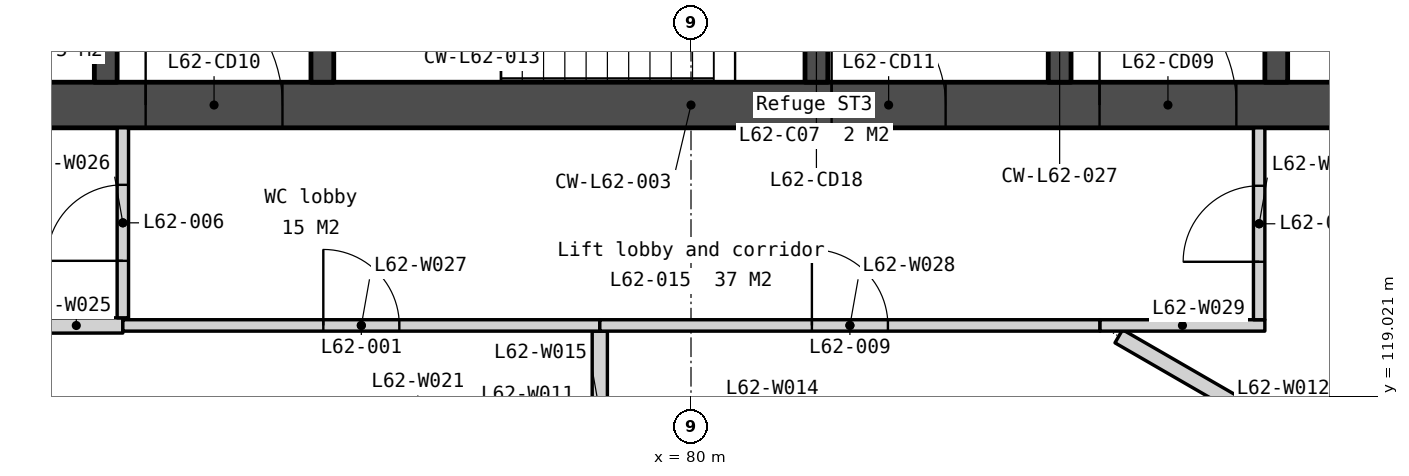
"""IFC4 building model, lengths in metres.
Left out: names, types, materials, properties, quantities, classifications, styles, units other than length and angle.
Written with IfcOpenShell. Run it as: python <this file> out.ifc"""

import sys

from ifc_helpers import new_model, si_unit, direction, frame, frame_2d, origin, place, context, subcontext, project, spatial, polyline, rectangle, outline, extrude, element, fill, save


model = new_model("IFC4")
c1 = context("Model", 3, precision=1e-05, world=origin(), true_north=direction((0.0, 1.0)))
c2 = subcontext(c1, "Body", "Model", "MODEL_VIEW")
j1 = project(units=[si_unit("LENGTHUNIT", "METRE"), si_unit("PLANEANGLEUNIT", "RADIAN")], contexts=[c1])
p1 = place(None, origin())
s1 = spatial("IfcSite", under=j1, at=p1, CompositionType="ELEMENT")
p2 = place(p1, origin())
s2 = spatial("IfcBuilding", under=s1, at=p2, CompositionType="ELEMENT")
p3 = place(p2, frame((0.0, 0.0, 254.3)))
s3 = spatial("IfcBuildingStorey", under=s2, at=p3, CompositionType="ELEMENT", Elevation=254.3)
p4 = place(p3, frame((69.0, 122.85, 0.0), z_axis=(0.0, 0.0, 1.0), x_axis=(1.0, 0.0, 0.0)))
e1 = element("IfcWall", 1, at=p4, inside=s3, PredefinedType="SOLIDWALL", context=c2, shape_type="SweptSolid", body=[
    extrude(rectangle(XDim=22.0, YDim=0.6, at=frame_2d((11.0, 0.0))), origin(), (0.0, 0.0, 1.0), 3.75),
])
p5 = place(p4, frame((16.375, 0.0, 0.0)))
e2 = element("IfcOpeningElement", 2, at=p5, cuts=e1, PredefinedType="OPENING", context=c2, shape_type="SweptSolid", body=[
    extrude(rectangle(XDim=1.8, YDim=2.1, at=frame_2d((0.9, 1.05))), frame((0.0, 0.31, 0.0), z_axis=(0.0, -1.0, 0.0), x_axis=(1.0, 0.0, 0.0)), (0.0, 0.0, 1.0), 0.62),
])
p6 = place(p4, frame((3.825, 0.0, 0.0)))
e3 = element("IfcOpeningElement", 3, at=p6, cuts=e1, PredefinedType="OPENING", context=c2, shape_type="SweptSolid", body=[
    extrude(rectangle(XDim=1.8, YDim=2.1, at=frame_2d((0.9, 1.05))), frame((0.0, 0.31, 0.0), z_axis=(0.0, -1.0, 0.0), x_axis=(1.0, 0.0, 0.0)), (0.0, 0.0, 1.0), 0.62),
])
p7 = place(p4, frame((12.85, 0.0, 0.0)))
e4 = element("IfcOpeningElement", 4, at=p7, cuts=e1, PredefinedType="OPENING", context=c2, shape_type="SweptSolid", body=[
    extrude(rectangle(XDim=1.5, YDim=2.1, at=frame_2d((0.75, 1.05))), frame((0.0, 0.31, 0.0), z_axis=(0.0, -1.0, 0.0), x_axis=(1.0, 0.0, 0.0)), (0.0, 0.0, 1.0), 0.62),
])
p8 = place(p3, frame((72.3, 133.95, 0.0), z_axis=(0.0, 0.0, 1.0), x_axis=(0.0, -1.0, 0.0)))
e5 = element("IfcWall", 5, at=p8, inside=s3, PredefinedType="SOLIDWALL", context=c2, shape_type="SweptSolid", body=[
    extrude(rectangle(XDim=10.8, YDim=0.3, at=frame_2d((5.4, 0.0))), origin(), (0.0, 0.0, 1.0), 3.75),
])
p9 = place(p8, frame((6.95, 0.0, 0.0)))
e6 = element("IfcOpeningElement", 6, at=p9, cuts=e5, PredefinedType="OPENING", context=c2, shape_type="SweptSolid", body=[
    extrude(rectangle(XDim=1.1, YDim=2.1, at=frame_2d((0.55, 1.05))), frame((0.0, 0.16, 0.0), z_axis=(0.0, -1.0, 0.0), x_axis=(1.0, 0.0, 0.0)), (0.0, 0.0, 1.0), 0.32),
])
p10 = place(p8, frame((9.35, 0.0, 0.0)))
e7 = element("IfcOpeningElement", 7, at=p10, cuts=e5, PredefinedType="OPENING", context=c2, shape_type="SweptSolid", body=[
    extrude(rectangle(XDim=0.9, YDim=2.1, at=frame_2d((0.45, 1.05))), frame((0.0, 0.16, 0.0), z_axis=(0.0, -1.0, 0.0), x_axis=(1.0, 0.0, 0.0)), (0.0, 0.0, 1.0), 0.32),
])
p11 = place(p8, frame((5.1, 0.0, 0.0)))
e8 = element("IfcOpeningElement", 8, at=p11, cuts=e5, PredefinedType="OPENING", context=c2, shape_type="SweptSolid", body=[
    extrude(rectangle(XDim=1.0, YDim=2.1, at=frame_2d((0.5, 1.05))), frame((0.0, 0.16, 0.0), z_axis=(0.0, -1.0, 0.0), x_axis=(1.0, 0.0, 0.0)), (0.0, 0.0, 1.0), 0.32),
])
p12 = place(p3, frame((75.15, 125.7, 0.0), z_axis=(0.0, 0.0, 1.0), x_axis=(0.0, -1.0, 0.0)))
e9 = element("IfcWall", 9, at=p12, inside=s3, PredefinedType="SOLIDWALL", context=c2, shape_type="SweptSolid", body=[
    extrude(rectangle(XDim=2.55, YDim=0.3, at=frame_2d((1.275, 0.0))), origin(), (0.0, 0.0, 1.0), 3.75),
])
p13 = place(p3, frame((81.65, 125.7, 0.0), z_axis=(0.0, 0.0, 1.0), x_axis=(0.0, -1.0, 0.0)))
e10 = element("IfcWall", 10, at=p13, inside=s3, PredefinedType="SOLIDWALL", context=c2, shape_type="SweptSolid", body=[
    extrude(rectangle(XDim=2.55, YDim=0.3, at=frame_2d((1.275, 0.0))), origin(), (0.0, 0.0, 1.0), 3.75),
])
p14 = place(p13, frame((0.75, 0.0, 0.0)))
e11 = element("IfcOpeningElement", 11, at=p14, cuts=e10, PredefinedType="OPENING", context=c2, shape_type="SweptSolid", body=[
    extrude(rectangle(XDim=1.0, YDim=2.1, at=frame_2d((0.5, 1.05))), frame((0.0, 0.16, 0.0), z_axis=(0.0, -1.0, 0.0), x_axis=(1.0, 0.0, 0.0)), (0.0, 0.0, 1.0), 0.32),
])
p15 = place(p3, frame((84.85, 125.85, 0.0), z_axis=(0.0, 0.0, 1.0), x_axis=(0.0, -1.0, 0.0)))
e12 = element("IfcWall", 12, at=p15, inside=s3, PredefinedType="SOLIDWALL", context=c2, shape_type="SweptSolid", body=[
    extrude(rectangle(XDim=2.7, YDim=0.3, at=frame_2d((1.35, 0.0))), origin(), (0.0, 0.0, 1.0), 3.75),
])
p16 = place(p3, frame((87.7, 133.95, 0.0), z_axis=(0.0, 0.0, 1.0), x_axis=(0.0, -1.0, 0.0)))
e13 = element("IfcWall", 13, at=p16, inside=s3, PredefinedType="SOLIDWALL", context=c2, shape_type="SweptSolid", body=[
    extrude(rectangle(XDim=10.8, YDim=0.3, at=frame_2d((5.4, 0.0))), origin(), (0.0, 0.0, 1.0), 3.75),
])
p17 = place(p16, frame((6.95, 0.0, 0.0)))
e14 = element("IfcOpeningElement", 14, at=p17, cuts=e13, PredefinedType="OPENING", context=c2, shape_type="SweptSolid", body=[
    extrude(rectangle(XDim=1.1, YDim=2.1, at=frame_2d((0.55, 1.05))), frame((0.0, 0.16, 0.0), z_axis=(0.0, -1.0, 0.0), x_axis=(1.0, 0.0, 0.0)), (0.0, 0.0, 1.0), 0.32),
])
p18 = place(p16, frame((5.1, 0.0, 0.0)))
e15 = element("IfcOpeningElement", 15, at=p18, cuts=e13, PredefinedType="OPENING", context=c2, shape_type="SweptSolid", body=[
    extrude(rectangle(XDim=1.0, YDim=2.1, at=frame_2d((0.5, 1.05))), frame((0.0, 0.16, 0.0), z_axis=(0.0, -1.0, 0.0), x_axis=(1.0, 0.0, 0.0)), (0.0, 0.0, 1.0), 0.32),
])
p19 = place(p16, frame((9.25, 0.0, 0.0)))
e16 = element("IfcOpeningElement", 16, at=p19, cuts=e13, PredefinedType="OPENING", context=c2, shape_type="SweptSolid", body=[
    extrude(rectangle(XDim=1.1, YDim=2.1, at=frame_2d((0.55, 1.05))), frame((0.0, 0.16, 0.0), z_axis=(0.0, -1.0, 0.0), x_axis=(1.0, 0.0, 0.0)), (0.0, 0.0, 1.0), 0.32),
])
p20 = place(p3, frame((60.609, 133.207, -0.15), z_axis=(0.0, 0.0, 1.0), x_axis=(0.500002536638, -0.866023939251, 0.0)))
e17 = element("IfcWall", 17, at=p20, inside=s3, PredefinedType="SOLIDWALL", context=c2, shape_type="SweptSolid", body=[
    extrude(outline(polyline([(36.972, 0.0), (36.972, 3.9), (0.0, 3.9), (0.0, 0.0), (36.972, 0.0)])), frame((0.0, 0.225, 0.0), z_axis=(0.0, -1.0, 0.0), x_axis=(1.0, 0.0, 0.0)), (0.0, 0.0, 1.0), 0.45),
])
p21 = place(p20, frame((3.172, 0.0, 0.95)))
e18 = element("IfcOpeningElement", 18, at=p21, cuts=e17, PredefinedType="OPENING", context=c2, shape_type="SweptSolid", body=[
    extrude(rectangle(XDim=1.2, YDim=2.2, at=frame_2d((0.6, 1.1))), frame((0.0, 0.235, 0.0), z_axis=(0.0, -1.0, 0.0), x_axis=(1.0, 0.0, 0.0)), (0.0, 0.0, 1.0), 0.47),
])
p22 = place(p20, frame((4.872, 0.0, 0.95)))
e19 = element("IfcOpeningElement", 19, at=p22, cuts=e17, PredefinedType="OPENING", context=c2, shape_type="SweptSolid", body=[
    extrude(rectangle(XDim=1.2, YDim=2.2, at=frame_2d((0.6, 1.1))), frame((0.0, 0.235, 0.0), z_axis=(0.0, -1.0, 0.0), x_axis=(1.0, 0.0, 0.0)), (0.0, 0.0, 1.0), 0.47),
])
p23 = place(p20, frame((12.415, 0.0, 0.95)))
e20 = element("IfcOpeningElement", 20, at=p23, cuts=e17, PredefinedType="OPENING", context=c2, shape_type="SweptSolid", body=[
    extrude(rectangle(XDim=1.2, YDim=2.2, at=frame_2d((0.6, 1.1))), frame((0.0, 0.235, 0.0), z_axis=(0.0, -1.0, 0.0), x_axis=(1.0, 0.0, 0.0)), (0.0, 0.0, 1.0), 0.47),
])
p24 = place(p20, frame((14.115, 0.0, 0.95)))
e21 = element("IfcOpeningElement", 21, at=p24, cuts=e17, PredefinedType="OPENING", context=c2, shape_type="SweptSolid", body=[
    extrude(rectangle(XDim=1.2, YDim=2.2, at=frame_2d((0.6, 1.1))), frame((0.0, 0.235, 0.0), z_axis=(0.0, -1.0, 0.0), x_axis=(1.0, 0.0, 0.0)), (0.0, 0.0, 1.0), 0.47),
])
p25 = place(p20, frame((21.658, 0.0, 0.95)))
e22 = element("IfcOpeningElement", 22, at=p25, cuts=e17, PredefinedType="OPENING", context=c2, shape_type="SweptSolid", body=[
    extrude(rectangle(XDim=1.2, YDim=2.2, at=frame_2d((0.6, 1.1))), frame((0.0, 0.235, 0.0), z_axis=(0.0, -1.0, 0.0), x_axis=(1.0, 0.0, 0.0)), (0.0, 0.0, 1.0), 0.47),
])
p26 = place(p20, frame((23.358, 0.0, 0.95)))
e23 = element("IfcOpeningElement", 23, at=p26, cuts=e17, PredefinedType="OPENING", context=c2, shape_type="SweptSolid", body=[
    extrude(rectangle(XDim=1.2, YDim=2.2, at=frame_2d((0.6, 1.1))), frame((0.0, 0.235, 0.0), z_axis=(0.0, -1.0, 0.0), x_axis=(1.0, 0.0, 0.0)), (0.0, 0.0, 1.0), 0.47),
])
p27 = place(p20, frame((30.901, 0.0, 0.95)))
e24 = element("IfcOpeningElement", 24, at=p27, cuts=e17, PredefinedType="OPENING", context=c2, shape_type="SweptSolid", body=[
    extrude(rectangle(XDim=1.2, YDim=2.2, at=frame_2d((0.6, 1.1))), frame((0.0, 0.235, 0.0), z_axis=(0.0, -1.0, 0.0), x_axis=(1.0, 0.0, 0.0)), (0.0, 0.0, 1.0), 0.47),
])
p28 = place(p20, frame((32.601, 0.0, 0.95)))
e25 = element("IfcOpeningElement", 25, at=p28, cuts=e17, PredefinedType="OPENING", context=c2, shape_type="SweptSolid", body=[
    extrude(rectangle(XDim=1.2, YDim=2.2, at=frame_2d((0.6, 1.1))), frame((0.0, 0.235, 0.0), z_axis=(0.0, -1.0, 0.0), x_axis=(1.0, 0.0, 0.0)), (0.0, 0.0, 1.0), 0.47),
])
p29 = place(p3, frame((80.905, 101.188, -0.15), z_axis=(0.0, 0.0, 1.0), x_axis=(0.500002536638, 0.866023939251, 0.0)))
e26 = element("IfcWall", 26, at=p29, inside=s3, PredefinedType="SOLIDWALL", context=c2, shape_type="SweptSolid", body=[
    extrude(outline(polyline([(36.972, 0.0), (36.972, 3.9), (0.0, 3.9), (0.0, 0.0), (36.972, 0.0)])), frame((0.0, 0.225, 0.0), z_axis=(0.0, -1.0, 0.0), x_axis=(1.0, 0.0, 0.0)), (0.0, 0.0, 1.0), 0.45),
])
p30 = place(p29, frame((3.172, 0.0, 0.95)))
e27 = element("IfcOpeningElement", 27, at=p30, cuts=e26, PredefinedType="OPENING", context=c2, shape_type="SweptSolid", body=[
    extrude(rectangle(XDim=1.2, YDim=2.2, at=frame_2d((0.6, 1.1))), frame((0.0, 0.235, 0.0), z_axis=(0.0, -1.0, 0.0), x_axis=(1.0, 0.0, 0.0)), (0.0, 0.0, 1.0), 0.47),
])
p31 = place(p29, frame((4.872, 0.0, 0.95)))
e28 = element("IfcOpeningElement", 28, at=p31, cuts=e26, PredefinedType="OPENING", context=c2, shape_type="SweptSolid", body=[
    extrude(rectangle(XDim=1.2, YDim=2.2, at=frame_2d((0.6, 1.1))), frame((0.0, 0.235, 0.0), z_axis=(0.0, -1.0, 0.0), x_axis=(1.0, 0.0, 0.0)), (0.0, 0.0, 1.0), 0.47),
])
p32 = place(p29, frame((12.415, 0.0, 0.95)))
e29 = element("IfcOpeningElement", 29, at=p32, cuts=e26, PredefinedType="OPENING", context=c2, shape_type="SweptSolid", body=[
    extrude(rectangle(XDim=1.2, YDim=2.2, at=frame_2d((0.6, 1.1))), frame((0.0, 0.235, 0.0), z_axis=(0.0, -1.0, 0.0), x_axis=(1.0, 0.0, 0.0)), (0.0, 0.0, 1.0), 0.47),
])
p33 = place(p29, frame((14.115, 0.0, 0.95)))
e30 = element("IfcOpeningElement", 30, at=p33, cuts=e26, PredefinedType="OPENING", context=c2, shape_type="SweptSolid", body=[
    extrude(rectangle(XDim=1.2, YDim=2.2, at=frame_2d((0.6, 1.1))), frame((0.0, 0.235, 0.0), z_axis=(0.0, -1.0, 0.0), x_axis=(1.0, 0.0, 0.0)), (0.0, 0.0, 1.0), 0.47),
])
p34 = place(p29, frame((21.658, 0.0, 0.95)))
e31 = element("IfcOpeningElement", 31, at=p34, cuts=e26, PredefinedType="OPENING", context=c2, shape_type="SweptSolid", body=[
    extrude(rectangle(XDim=1.2, YDim=2.2, at=frame_2d((0.6, 1.1))), frame((0.0, 0.235, 0.0), z_axis=(0.0, -1.0, 0.0), x_axis=(1.0, 0.0, 0.0)), (0.0, 0.0, 1.0), 0.47),
])
p35 = place(p29, frame((23.358, 0.0, 0.95)))
e32 = element("IfcOpeningElement", 32, at=p35, cuts=e26, PredefinedType="OPENING", context=c2, shape_type="SweptSolid", body=[
    extrude(rectangle(XDim=1.2, YDim=2.2, at=frame_2d((0.6, 1.1))), frame((0.0, 0.235, 0.0), z_axis=(0.0, -1.0, 0.0), x_axis=(1.0, 0.0, 0.0)), (0.0, 0.0, 1.0), 0.47),
])
p36 = place(p29, frame((30.901, 0.0, 0.95)))
e33 = element("IfcOpeningElement", 33, at=p36, cuts=e26, PredefinedType="OPENING", context=c2, shape_type="SweptSolid", body=[
    extrude(rectangle(XDim=1.2, YDim=2.2, at=frame_2d((0.6, 1.1))), frame((0.0, 0.235, 0.0), z_axis=(0.0, -1.0, 0.0), x_axis=(1.0, 0.0, 0.0)), (0.0, 0.0, 1.0), 0.47),
])
p37 = place(p29, frame((32.601, 0.0, 0.95)))
e34 = element("IfcOpeningElement", 34, at=p37, cuts=e26, PredefinedType="OPENING", context=c2, shape_type="SweptSolid", body=[
    extrude(rectangle(XDim=1.2, YDim=2.2, at=frame_2d((0.6, 1.1))), frame((0.0, 0.235, 0.0), z_axis=(0.0, -1.0, 0.0), x_axis=(1.0, 0.0, 0.0)), (0.0, 0.0, 1.0), 0.47),
])
p38 = place(p3, frame((85.628, 119.807, 0.0), z_axis=(0.0, 0.0, 1.0), x_axis=(0.866031670005, -0.49998914643, 0.0)))
e35 = element("IfcWall", 35, at=p38, inside=s3, PredefinedType="PARTITIONING", context=c2, shape_type="SweptSolid", body=[
    extrude(rectangle(XDim=4.992, YDim=0.2, at=frame_2d((2.496, 0.0))), origin(), (0.0, 0.0, 1.0), 3.75),
])
p39 = place(p3, frame((78.8, 117.74, 0.0), z_axis=(0.0, 0.0, 1.0), x_axis=(0.0, 1.0, 0.0)))
e36 = element("IfcWall", 36, at=p39, inside=s3, PredefinedType="PARTITIONING", context=c2, shape_type="SweptSolid", body=[
    extrude(rectangle(XDim=2.135, YDim=0.2, at=frame_2d((1.067, 0.0))), origin(), (0.0, 0.0, 1.0), 3.75),
])
p40 = place(p3, frame((71.3, 119.948, 0.0), z_axis=(0.0, 0.0, 1.0), x_axis=(0.999998728662, 0.001594576406, 0.0)))
e37 = element("IfcWall", 37, at=p40, inside=s3, PredefinedType="PARTITIONING", context=c2, shape_type="SweptSolid", body=[
    extrude(rectangle(XDim=1.225, YDim=0.2, at=frame_2d((0.612, 0.0))), origin(), (0.0, 0.0, 1.0), 3.75),
])
p41 = place(p3, frame((72.525, 120.05, 0.0), z_axis=(0.0, 0.0, 1.0), x_axis=(0.0, 1.0, 0.0)))
e38 = element("IfcWall", 38, at=p41, inside=s3, PredefinedType="PARTITIONING", context=c2, shape_type="SweptSolid", body=[
    extrude(rectangle(XDim=2.5, YDim=0.15, at=frame_2d((1.25, 0.0))), origin(), (0.0, 0.0, 1.0), 3.75),
])
p42 = place(p41, frame((0.75, 0.0, 0.0)))
e39 = element("IfcOpeningElement", 39, at=p42, cuts=e38, PredefinedType="OPENING", context=c2, shape_type="SweptSolid", body=[
    extrude(rectangle(XDim=1.0, YDim=2.1, at=frame_2d((0.5, 1.05))), frame((0.0, 0.085, 0.0), z_axis=(0.0, -1.0, 0.0), x_axis=(1.0, 0.0, 0.0)), (0.0, 0.0, 1.0), 0.17),
])
p43 = place(p3, frame((72.525, 119.95, 0.0), z_axis=(0.0, 0.0, 1.0), x_axis=(1.0, 0.0, 0.0)))
e40 = element("IfcWall", 40, at=p43, inside=s3, PredefinedType="PARTITIONING", context=c2, shape_type="SweptSolid", body=[
    extrude(rectangle(XDim=6.275, YDim=0.15, at=frame_2d((3.138, 0.0))), origin(), (0.0, 0.0, 1.0), 3.75),
])
p44 = place(p43, frame((2.637, 0.0, 0.0)))
e41 = element("IfcOpeningElement", 41, at=p44, cuts=e40, PredefinedType="OPENING", context=c2, shape_type="SweptSolid", body=[
    extrude(rectangle(XDim=1.0, YDim=2.1, at=frame_2d((0.5, 1.05))), frame((0.0, 0.085, 0.0), z_axis=(0.0, -1.0, 0.0), x_axis=(1.0, 0.0, 0.0)), (0.0, 0.0, 1.0), 0.17),
])
p45 = place(p3, frame((78.8, 119.95, 0.0), z_axis=(0.0, 0.0, 1.0), x_axis=(1.0, 0.0, 0.0)))
e42 = element("IfcWall", 42, at=p45, inside=s3, PredefinedType="PARTITIONING", context=c2, shape_type="SweptSolid", body=[
    extrude(rectangle(XDim=6.581, YDim=0.15, at=frame_2d((3.291, 0.0))), origin(), (0.0, 0.0, 1.0), 3.75),
])
p46 = place(p45, frame((2.791, 0.0, 0.0)))
e43 = element("IfcOpeningElement", 43, at=p46, cuts=e42, PredefinedType="OPENING", context=c2, shape_type="SweptSolid", body=[
    extrude(rectangle(XDim=1.0, YDim=2.1, at=frame_2d((0.5, 1.05))), frame((0.0, 0.085, 0.0), z_axis=(0.0, -1.0, 0.0), x_axis=(1.0, 0.0, 0.0)), (0.0, 0.0, 1.0), 0.17),
])
p47 = place(p3, frame((85.381, 119.95, 0.0), z_axis=(0.0, 0.0, 1.0), x_axis=(1.0, 0.0, 0.0)))
e44 = element("IfcWall", 44, at=p47, inside=s3, PredefinedType="PARTITIONING", context=c2, shape_type="SweptSolid", body=[
    extrude(rectangle(XDim=2.169, YDim=0.15, at=frame_2d((1.084, 0.0))), origin(), (0.0, 0.0, 1.0), 3.75),
])
p48 = place(p3, frame((87.475, 120.025, 0.0), z_axis=(0.0, 0.0, 1.0), x_axis=(0.0, 1.0, 0.0)))
e45 = element("IfcWall", 45, at=p48, inside=s3, PredefinedType="PARTITIONING", context=c2, shape_type="SweptSolid", body=[
    extrude(rectangle(XDim=2.525, YDim=0.15, at=frame_2d((1.263, 0.0))), origin(), (0.0, 0.0, 1.0), 3.75),
])
p49 = place(p48, frame((0.762, 0.0, 0.0)))
e46 = element("IfcOpeningElement", 46, at=p49, cuts=e45, PredefinedType="OPENING", context=c2, shape_type="SweptSolid", body=[
    extrude(rectangle(XDim=1.0, YDim=2.1, at=frame_2d((0.5, 1.05))), frame((0.0, 0.085, 0.0), z_axis=(0.0, -1.0, 0.0), x_axis=(1.0, 0.0, 0.0)), (0.0, 0.0, 1.0), 0.17),
])
p50 = place(p5, origin())
e47 = element("IfcDoor", 47, at=p50, inside=s3, OperationType="DOUBLE_DOOR_DOUBLE_SWING", PredefinedType="DOOR", context=c2, shape_type="SweptSolid", body=[
    extrude(rectangle(XDim=1.8, YDim=2.1, at=frame_2d((0.9, 1.05))), frame((0.0, 0.025, 0.0), z_axis=(0.0, -1.0, 0.0), x_axis=(1.0, 0.0, 0.0)), (0.0, 0.0, 1.0), 0.05),
])
fill(e2, e47)
p51 = place(p6, origin())
e48 = element("IfcDoor", 48, at=p51, inside=s3, OperationType="DOUBLE_DOOR_DOUBLE_SWING", PredefinedType="DOOR", context=c2, shape_type="SweptSolid", body=[
    extrude(rectangle(XDim=1.8, YDim=2.1, at=frame_2d((0.9, 1.05))), frame((0.0, 0.025, 0.0), z_axis=(0.0, -1.0, 0.0), x_axis=(1.0, 0.0, 0.0)), (0.0, 0.0, 1.0), 0.05),
])
fill(e3, e48)
p52 = place(p7, origin())
e49 = element("IfcDoor", 49, at=p52, inside=s3, OperationType="DOUBLE_DOOR_DOUBLE_SWING", PredefinedType="DOOR", context=c2, shape_type="SweptSolid", body=[
    extrude(rectangle(XDim=1.5, YDim=2.1, at=frame_2d((0.75, 1.05))), frame((0.0, 0.025, 0.0), z_axis=(0.0, -1.0, 0.0), x_axis=(1.0, 0.0, 0.0)), (0.0, 0.0, 1.0), 0.05),
])
fill(e4, e49)
p53 = place(p44, origin())
e50 = element("IfcDoor", 50, at=p53, inside=s3, OperationType="SINGLE_SWING_LEFT", PredefinedType="DOOR", context=c2, shape_type="SweptSolid", body=[
    extrude(rectangle(XDim=1.0, YDim=2.1, at=frame_2d((0.5, 1.05))), frame((0.0, 0.025, 0.0), z_axis=(0.0, -1.0, 0.0), x_axis=(1.0, 0.0, 0.0)), (0.0, 0.0, 1.0), 0.05),
])
fill(e41, e50)
p54 = place(p42, origin())
e51 = element("IfcDoor", 51, at=p54, inside=s3, OperationType="SINGLE_SWING_LEFT", PredefinedType="DOOR", context=c2, shape_type="SweptSolid", body=[
    extrude(rectangle(XDim=1.0, YDim=2.1, at=frame_2d((0.5, 1.05))), frame((0.0, 0.025, 0.0), z_axis=(0.0, -1.0, 0.0), x_axis=(1.0, 0.0, 0.0)), (0.0, 0.0, 1.0), 0.05),
])
fill(e39, e51)
p55 = place(p46, origin())
e52 = element("IfcDoor", 52, at=p55, inside=s3, OperationType="SINGLE_SWING_LEFT", PredefinedType="DOOR", context=c2, shape_type="SweptSolid", body=[
    extrude(rectangle(XDim=1.0, YDim=2.1, at=frame_2d((0.5, 1.05))), frame((0.0, 0.025, 0.0), z_axis=(0.0, -1.0, 0.0), x_axis=(1.0, 0.0, 0.0)), (0.0, 0.0, 1.0), 0.05),
])
fill(e43, e52)
p56 = place(p49, origin())
e53 = element("IfcDoor", 53, at=p56, inside=s3, OperationType="SINGLE_SWING_LEFT", PredefinedType="DOOR", context=c2, shape_type="SweptSolid", body=[
    extrude(rectangle(XDim=1.0, YDim=2.1, at=frame_2d((0.5, 1.05))), frame((0.0, 0.025, 0.0), z_axis=(0.0, -1.0, 0.0), x_axis=(1.0, 0.0, 0.0)), (0.0, 0.0, 1.0), 0.05),
])
fill(e46, e53)
save(model, sys.argv[1])
